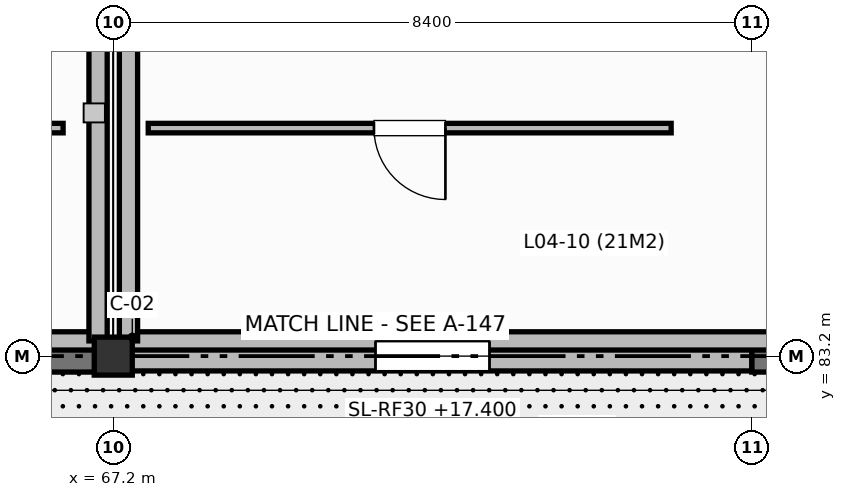
"""IFC4 building model, lengths in metres.
Left out: names, types, materials, properties, quantities, classifications, styles, units other than length and angle.
Written with IfcOpenShell. Run it as: python <this file> out.ifc"""

import sys

from ifc_helpers import new_model, si_unit, direction, frame, frame_2d, origin, origin_2d, place, context, subcontext, project, spatial, rectangle, extrude, element, fill, save


model = new_model("IFC4")
c1 = context("Model", 3, precision=1e-05, world=origin(), true_north=direction((0.0, 1.0)))
c2 = subcontext(c1, "Body", "Model", "MODEL_VIEW")
j1 = project(units=[si_unit("LENGTHUNIT", "METRE"), si_unit("PLANEANGLEUNIT", "RADIAN")], contexts=[c1])
p1 = place(None, origin())
s1 = spatial("IfcSite", under=j1, at=p1, CompositionType="ELEMENT")
p2 = place(p1, origin())
s2 = spatial("IfcBuilding", under=s1, at=p2, CompositionType="ELEMENT")
p3 = place(p2, frame((0.0, 0.0, 17.4)))
s3 = spatial("IfcBuildingStorey", under=s2, at=p3, CompositionType="ELEMENT", Elevation=17.4)
p4 = place(p3, frame((67.2, 83.2, 0.0), z_axis=(0.0, 0.0, 1.0), x_axis=(1.0, 0.0, 0.0)))
e1 = element("IfcColumn", 1, at=p4, inside=s3, PredefinedType="COLUMN", context=c2, shape_type="SweptSolid", body=[
    extrude(rectangle(XDim=0.5, YDim=0.5, at=origin_2d()), origin(), (0.0, 0.0, 1.0), 4.2),
])
p5 = place(p3, frame((84.0, 83.2, 0.0), z_axis=(0.0, 0.0, 1.0), x_axis=(-1.0, 0.0, 0.0)))
e2 = element("IfcWall", 2, at=p5, inside=s3, PredefinedType="STANDARD", context=c2, shape_type="SweptSolid", body=[
    extrude(rectangle(XDim=8.4, YDim=0.42, at=frame_2d((4.2, 0.0))), origin(), (0.0, 0.0, 1.0), 3.84),
])
p6 = place(p5, frame((3.6, 0.0, 0.8)))
e3 = element("IfcOpeningElement", 3, at=p6, cuts=e2, PredefinedType="OPENING", context=c2, shape_type="SweptSolid", body=[
    extrude(rectangle(XDim=1.2, YDim=1.45, at=frame_2d((0.6, 0.725))), frame((0.0, 0.22, 0.0), z_axis=(0.0, -1.0, 0.0), x_axis=(1.0, 0.0, 0.0)), (0.0, 0.0, 1.0), 0.44),
])
p7 = place(p3, frame((75.6, 83.2, 0.0), z_axis=(0.0, 0.0, 1.0), x_axis=(-1.0, 0.0, 0.0)))
e4 = element("IfcWall", 4, at=p7, inside=s3, PredefinedType="STANDARD", context=c2, shape_type="SweptSolid", body=[
    extrude(rectangle(XDim=8.4, YDim=0.39, at=frame_2d((4.2, 0.0))), origin(), (0.0, 0.0, 1.0), 3.84),
])
p8 = place(p7, frame((3.45, 0.0, 0.8)))
e5 = element("IfcOpeningElement", 5, at=p8, cuts=e4, PredefinedType="OPENING", context=c2, shape_type="SweptSolid", body=[
    extrude(rectangle(XDim=1.5, YDim=1.45, at=frame_2d((0.75, 0.725))), frame((0.0, 0.205, 0.0), z_axis=(0.0, -1.0, 0.0), x_axis=(1.0, 0.0, 0.0)), (0.0, 0.0, 1.0), 0.41),
])
p9 = place(p3, frame((67.2, 83.2, 0.0), z_axis=(0.0, 0.0, 1.0), x_axis=(-1.0, 0.0, 0.0)))
e6 = element("IfcWall", 6, at=p9, inside=s3, PredefinedType="STANDARD", context=c2, shape_type="SweptSolid", body=[
    extrude(rectangle(XDim=8.4, YDim=0.42, at=frame_2d((4.2, 0.0))), origin(), (0.0, 0.0, 1.0), 3.84),
])
p10 = place(p9, frame((3.3, 0.0, 0.8)))
e7 = element("IfcOpeningElement", 7, at=p10, cuts=e6, PredefinedType="OPENING", context=c2, shape_type="SweptSolid", body=[
    extrude(rectangle(XDim=1.8, YDim=1.45, at=frame_2d((0.9, 0.725))), frame((0.0, 0.22, 0.0), z_axis=(0.0, -1.0, 0.0), x_axis=(1.0, 0.0, 0.0)), (0.0, 0.0, 1.0), 0.44),
])
p11 = place(p3, frame((43.4, 83.4, 4.2), z_axis=(0.0, 0.0, 1.0), x_axis=(1.0, 0.0, 0.0)))
e8 = element("IfcWall", 8, at=p11, inside=s3, PredefinedType="PARAPET", context=c2, shape_type="SweptSolid", body=[
    extrude(rectangle(XDim=23.6, YDim=0.24, at=frame_2d((11.8, 0.0))), origin(), (0.0, 0.0, 1.0), 1.15),
])
p12 = place(p3, frame((67.0, 83.4, 4.2), z_axis=(0.0, 0.0, 1.0), x_axis=(0.0, 1.0, 0.0)))
e9 = element("IfcWall", 9, at=p12, inside=s3, PredefinedType="PARAPET", context=c2, shape_type="SweptSolid", body=[
    extrude(rectangle(XDim=31.6, YDim=0.24, at=frame_2d((15.8, 0.0))), origin(), (0.0, 0.0, 1.0), 1.15),
])
p13 = place(p3, frame((67.4, 83.4, 4.2), z_axis=(0.0, 0.0, 1.0), x_axis=(1.0, 0.0, 0.0)))
e10 = element("IfcWall", 10, at=p13, inside=s3, PredefinedType="PARAPET", context=c2, shape_type="SweptSolid", body=[
    extrude(rectangle(XDim=33.2, YDim=0.24, at=frame_2d((16.6, 0.0))), origin(), (0.0, 0.0, 1.0), 1.15),
])
p14 = place(p3, frame((67.4, 102.2, 4.2), z_axis=(0.0, 0.0, 1.0), x_axis=(0.0, -1.0, 0.0)))
e11 = element("IfcWall", 11, at=p14, inside=s3, PredefinedType="PARAPET", context=c2, shape_type="SweptSolid", body=[
    extrude(rectangle(XDim=18.8, YDim=0.24, at=frame_2d((9.4, 0.0))), origin(), (0.0, 0.0, 1.0), 1.15),
])
p15 = place(p3, frame((66.54, 86.2, 0.0), z_axis=(0.0, 0.0, 1.0), x_axis=(-1.0, 0.0, 0.0)))
e12 = element("IfcWall", 12, at=p15, inside=s3, PredefinedType="PARTITIONING", context=c2, shape_type="SweptSolid", body=[
    extrude(rectangle(XDim=7.48, YDim=0.125, at=frame_2d((3.74, 0.0))), origin(), (0.0, 0.0, 1.0), 3.84),
])
p16 = place(p15, frame((3.27, 0.0, 0.0)))
e13 = element("IfcOpeningElement", 13, at=p16, cuts=e12, PredefinedType="OPENING", context=c2, shape_type="SweptSolid", body=[
    extrude(rectangle(XDim=0.94, YDim=2.1, at=frame_2d((0.47, 1.05))), frame((0.0, 0.073, 0.0), z_axis=(0.0, -1.0, 0.0), x_axis=(1.0, 0.0, 0.0)), (0.0, 0.0, 1.0), 0.145),
])
p17 = place(p3, frame((74.54, 86.2, 0.0), z_axis=(0.0, 0.0, 1.0), x_axis=(-1.0, 0.0, 0.0)))
e14 = element("IfcWall", 14, at=p17, inside=s3, PredefinedType="PARTITIONING", context=c2, shape_type="SweptSolid", body=[
    extrude(rectangle(XDim=6.88, YDim=0.125, at=frame_2d((3.44, 0.0))), origin(), (0.0, 0.0, 1.0), 3.84),
])
p18 = place(p17, frame((2.97, 0.0, 0.0)))
e15 = element("IfcOpeningElement", 15, at=p18, cuts=e14, PredefinedType="OPENING", context=c2, shape_type="SweptSolid", body=[
    extrude(rectangle(XDim=0.94, YDim=2.1, at=frame_2d((0.47, 1.05))), frame((0.0, 0.073, 0.0), z_axis=(0.0, -1.0, 0.0), x_axis=(1.0, 0.0, 0.0)), (0.0, 0.0, 1.0), 0.145),
])
p19 = place(p8, origin())
e16 = element("IfcWindow", 16, at=p19, inside=s3, PartitioningType="SINGLE_PANEL", PredefinedType="WINDOW", context=c2, shape_type="SweptSolid", body=[
    extrude(rectangle(XDim=1.5, YDim=1.45, at=frame_2d((0.75, 0.725))), frame((0.0, 0.03, 0.0), z_axis=(0.0, -1.0, 0.0), x_axis=(1.0, 0.0, 0.0)), (0.0, 0.0, 1.0), 0.06),
])
fill(e5, e16)
p20 = place(p18, origin())
e17 = element("IfcDoor", 17, at=p20, inside=s3, OperationType="SINGLE_SWING_LEFT", PredefinedType="DOOR", context=c2, shape_type="SweptSolid", body=[
    extrude(rectangle(XDim=0.94, YDim=2.1, at=frame_2d((0.47, 1.05))), frame((0.0, 0.025, 0.0), z_axis=(0.0, -1.0, 0.0), x_axis=(1.0, 0.0, 0.0)), (0.0, 0.0, 1.0), 0.05),
])
fill(e15, e17)
save(model, sys.argv[1])
